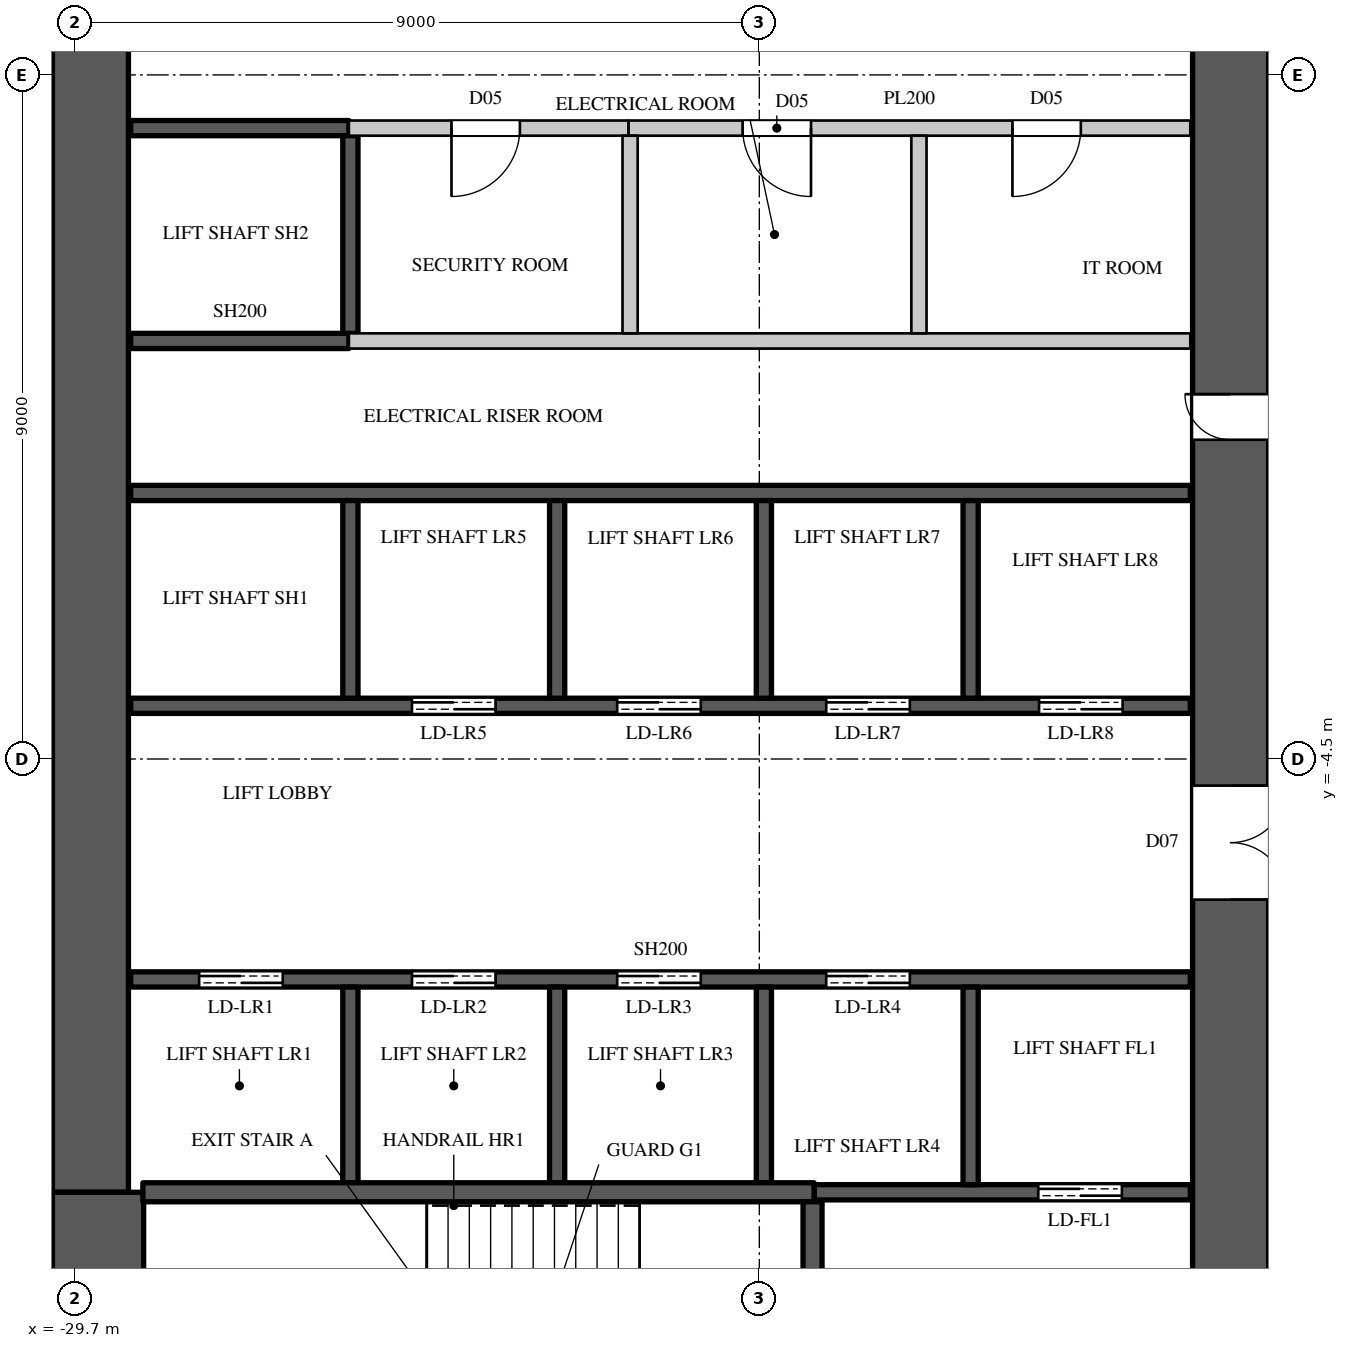
"""IFC4 building model, lengths in metres.
Left out: names, types, materials, properties, quantities, classifications, styles, units other than length and angle.
Written with IfcOpenShell. Run it as: python <this file> out.ifc"""

import sys

from ifc_helpers import new_model, si_unit, direction, frame, frame_2d, origin, place, context, subcontext, project, spatial, rectangle, extrude, element, fill, save


model = new_model("IFC4")
c1 = context("Model", 3, precision=1e-05, world=origin(), true_north=direction((0.0, 1.0)))
c2 = subcontext(c1, "Body", "Model", "MODEL_VIEW")
j1 = project(units=[si_unit("LENGTHUNIT", "METRE"), si_unit("PLANEANGLEUNIT", "RADIAN")], contexts=[c1])
p1 = place(None, origin())
s1 = spatial("IfcSite", under=j1, at=p1, CompositionType="ELEMENT")
p2 = place(p1, origin())
s2 = spatial("IfcBuilding", under=s1, at=p2, CompositionType="ELEMENT")
p3 = place(p2, frame((0.0, 0.0, 131.1)))
s3 = spatial("IfcBuildingStorey", under=s2, at=p3, CompositionType="ELEMENT", Elevation=131.1)
p4 = place(p3, frame((-14.5, -14.8, 0.0), z_axis=(0.0, 0.0, 1.0), x_axis=(0.0, 1.0, 0.0)))
e1 = element("IfcWall", 1, at=p4, inside=s3, PredefinedType="SHEAR", context=c2, shape_type="SweptSolid", body=[
    extrude(rectangle(XDim=29.6, YDim=1.0, at=frame_2d((14.8, 0.0))), origin(), (0.0, 0.0, 1.0), 3.6),
])
p5 = place(p4, frame((8.45, 0.0, 0.0)))
e2 = element("IfcOpeningElement", 2, at=p5, cuts=e1, PredefinedType="OPENING", context=c2, shape_type="SweptSolid", body=[
    extrude(rectangle(XDim=1.5, YDim=2.4, at=frame_2d((0.75, 1.2))), frame((0.0, 0.51, 0.0), z_axis=(0.0, -1.0, 0.0), x_axis=(1.0, 0.0, 0.0)), (0.0, 0.0, 1.0), 1.02),
])
p6 = place(p4, frame((19.65, 0.0, 0.0)))
e3 = element("IfcOpeningElement", 3, at=p6, cuts=e1, PredefinedType="OPENING", context=c2, shape_type="SweptSolid", body=[
    extrude(rectangle(XDim=1.5, YDim=2.4, at=frame_2d((0.75, 1.2))), frame((0.0, 0.51, 0.0), z_axis=(0.0, -1.0, 0.0), x_axis=(1.0, 0.0, 0.0)), (0.0, 0.0, 1.0), 1.02),
])
p7 = place(p4, frame((14.5, 0.0, 0.0)))
e4 = element("IfcOpeningElement", 4, at=p7, cuts=e1, PredefinedType="OPENING", context=c2, shape_type="SweptSolid", body=[
    extrude(rectangle(XDim=0.6, YDim=2.0, at=frame_2d((0.3, 1.0))), frame((0.0, 0.51, 0.0), z_axis=(0.0, -1.0, 0.0), x_axis=(1.0, 0.0, 0.0)), (0.0, 0.0, 1.0), 1.02),
])
p8 = place(p3, frame((-29.5, -10.2, 0.0), z_axis=(0.0, 0.0, 1.0), x_axis=(0.0, 1.0, 0.0)))
e5 = element("IfcWall", 5, at=p8, inside=s3, PredefinedType="SHEAR", context=c2, shape_type="SweptSolid", body=[
    extrude(rectangle(XDim=20.4, YDim=1.0, at=frame_2d((10.2, 0.0))), origin(), (0.0, 0.0, 1.0), 3.6),
])
p9 = place(p3, frame((-29.4, -14.8, 0.0), z_axis=(0.0, 0.0, 1.0), x_axis=(0.0, 1.0, 0.0)))
e6 = element("IfcWall", 6, at=p9, inside=s3, PredefinedType="SHEAR", context=c2, shape_type="SweptSolid", body=[
    extrude(rectangle(XDim=4.6, YDim=1.2, at=frame_2d((2.3, 0.0))), origin(), (0.0, 0.0, 1.0), 3.6),
])
p10 = place(p3, frame((-26.1, 3.8, 0.0), z_axis=(0.0, 0.0, 1.0), x_axis=(1.0, 0.0, 0.0)))
e7 = element("IfcWall", 7, at=p10, inside=s3, PredefinedType="PARTITIONING", context=c2, shape_type="SweptSolid", body=[
    extrude(rectangle(XDim=3.68, YDim=0.2, at=frame_2d((1.84, 0.0))), origin(), (0.0, 0.0, 1.0), 3.3),
])
p11 = place(p10, frame((1.35, 0.0, 0.0)))
e8 = element("IfcOpeningElement", 8, at=p11, cuts=e7, PredefinedType="OPENING", context=c2, shape_type="SweptSolid", body=[
    extrude(rectangle(XDim=0.9, YDim=2.2, at=frame_2d((0.45, 1.1))), frame((0.0, 0.11, 0.0), z_axis=(0.0, -1.0, 0.0), x_axis=(1.0, 0.0, 0.0)), (0.0, 0.0, 1.0), 0.22),
])
p12 = place(p3, frame((-26.1, 1.0, 0.0), z_axis=(0.0, 0.0, 1.0), x_axis=(1.0, 0.0, 0.0)))
e9 = element("IfcWall", 9, at=p12, inside=s3, PredefinedType="PARTITIONING", context=c2, shape_type="SweptSolid", body=[
    extrude(rectangle(XDim=11.07, YDim=0.2, at=frame_2d((5.535, 0.0))), origin(), (0.0, 0.0, 1.0), 3.3),
])
p13 = place(p3, frame((-22.42, 3.8, 0.0), z_axis=(0.0, 0.0, 1.0), x_axis=(1.0, 0.0, 0.0)))
e10 = element("IfcWall", 10, at=p13, inside=s3, PredefinedType="PARTITIONING", context=c2, shape_type="SweptSolid", body=[
    extrude(rectangle(XDim=7.39, YDim=0.2, at=frame_2d((3.695, 0.0))), origin(), (0.0, 0.0, 1.0), 3.3),
])
p14 = place(p13, frame((1.5, 0.0, 0.0)))
e11 = element("IfcOpeningElement", 11, at=p14, cuts=e10, PredefinedType="OPENING", context=c2, shape_type="SweptSolid", body=[
    extrude(rectangle(XDim=0.9, YDim=2.2, at=frame_2d((0.45, 1.1))), frame((0.0, 0.11, 0.0), z_axis=(0.0, -1.0, 0.0), x_axis=(1.0, 0.0, 0.0)), (0.0, 0.0, 1.0), 0.22),
])
p15 = place(p13, frame((5.05, 0.0, 0.0)))
e12 = element("IfcOpeningElement", 12, at=p15, cuts=e10, PredefinedType="OPENING", context=c2, shape_type="SweptSolid", body=[
    extrude(rectangle(XDim=0.9, YDim=2.2, at=frame_2d((0.45, 1.1))), frame((0.0, 0.11, 0.0), z_axis=(0.0, -1.0, 0.0), x_axis=(1.0, 0.0, 0.0)), (0.0, 0.0, 1.0), 0.22),
])
for number, where, z_axis, x_axis in (
    (13, (-22.4, 1.1, 0.0), (0.0, 0.0, 1.0), (0.0, 1.0, 0.0)),
    (14, (-18.6, 1.1, 0.0), (0.0, 0.0, 1.0), (0.0, 1.0, 0.0)),
):
    element("IfcWall", number, at=place(p3, frame(where, z_axis=z_axis, x_axis=x_axis)), inside=s3, PredefinedType="PARTITIONING", context=c2, shape_type="SweptSolid", body=[
        extrude(rectangle(XDim=2.6, YDim=0.2, at=frame_2d((1.3, 0.0))), origin(), (0.0, 0.0, 1.0), 3.3),
    ])
p16 = place(p3, frame((-28.97, -7.4, 0.0), z_axis=(0.0, 0.0, 1.0), x_axis=(1.0, 0.0, 0.0)))
e15 = element("IfcWall", 15, at=p16, inside=s3, PredefinedType="SHEAR", context=c2, shape_type="SweptSolid", body=[
    extrude(rectangle(XDim=13.94, YDim=0.2, at=frame_2d((6.97, 0.0))), origin(), (0.0, 0.0, 1.0), 3.3),
])
p17 = place(p16, frame((0.9, 0.0, 0.0)))
e16 = element("IfcOpeningElement", 16, at=p17, cuts=e15, PredefinedType="OPENING", context=c2, shape_type="SweptSolid", body=[
    extrude(rectangle(XDim=1.1, YDim=2.2, at=frame_2d((0.55, 1.1))), frame((0.0, 0.11, 0.0), z_axis=(0.0, -1.0, 0.0), x_axis=(1.0, 0.0, 0.0)), (0.0, 0.0, 1.0), 0.22),
])
p18 = place(p16, frame((3.7, 0.0, 0.0)))
e17 = element("IfcOpeningElement", 17, at=p18, cuts=e15, PredefinedType="OPENING", context=c2, shape_type="SweptSolid", body=[
    extrude(rectangle(XDim=1.1, YDim=2.2, at=frame_2d((0.55, 1.1))), frame((0.0, 0.11, 0.0), z_axis=(0.0, -1.0, 0.0), x_axis=(1.0, 0.0, 0.0)), (0.0, 0.0, 1.0), 0.22),
])
p19 = place(p16, frame((6.4, 0.0, 0.0)))
e18 = element("IfcOpeningElement", 18, at=p19, cuts=e15, PredefinedType="OPENING", context=c2, shape_type="SweptSolid", body=[
    extrude(rectangle(XDim=1.1, YDim=2.2, at=frame_2d((0.55, 1.1))), frame((0.0, 0.11, 0.0), z_axis=(0.0, -1.0, 0.0), x_axis=(1.0, 0.0, 0.0)), (0.0, 0.0, 1.0), 0.22),
])
p20 = place(p16, frame((9.15, 0.0, 0.0)))
e19 = element("IfcOpeningElement", 19, at=p20, cuts=e15, PredefinedType="OPENING", context=c2, shape_type="SweptSolid", body=[
    extrude(rectangle(XDim=1.1, YDim=2.2, at=frame_2d((0.55, 1.1))), frame((0.0, 0.11, 0.0), z_axis=(0.0, -1.0, 0.0), x_axis=(1.0, 0.0, 0.0)), (0.0, 0.0, 1.0), 0.22),
])
p21 = place(p3, frame((-28.97, -3.8, 0.0), z_axis=(0.0, 0.0, 1.0), x_axis=(1.0, 0.0, 0.0)))
e20 = element("IfcWall", 20, at=p21, inside=s3, PredefinedType="SHEAR", context=c2, shape_type="SweptSolid", body=[
    extrude(rectangle(XDim=13.94, YDim=0.2, at=frame_2d((6.97, 0.0))), origin(), (0.0, 0.0, 1.0), 3.3),
])
p22 = place(p21, frame((3.7, 0.0, 0.0)))
e21 = element("IfcOpeningElement", 21, at=p22, cuts=e20, PredefinedType="OPENING", context=c2, shape_type="SweptSolid", body=[
    extrude(rectangle(XDim=1.1, YDim=2.2, at=frame_2d((0.55, 1.1))), frame((0.0, 0.11, 0.0), z_axis=(0.0, -1.0, 0.0), x_axis=(1.0, 0.0, 0.0)), (0.0, 0.0, 1.0), 0.22),
])
p23 = place(p21, frame((6.4, 0.0, 0.0)))
e22 = element("IfcOpeningElement", 22, at=p23, cuts=e20, PredefinedType="OPENING", context=c2, shape_type="SweptSolid", body=[
    extrude(rectangle(XDim=1.1, YDim=2.2, at=frame_2d((0.55, 1.1))), frame((0.0, 0.11, 0.0), z_axis=(0.0, -1.0, 0.0), x_axis=(1.0, 0.0, 0.0)), (0.0, 0.0, 1.0), 0.22),
])
p24 = place(p21, frame((9.15, 0.0, 0.0)))
e23 = element("IfcOpeningElement", 23, at=p24, cuts=e20, PredefinedType="OPENING", context=c2, shape_type="SweptSolid", body=[
    extrude(rectangle(XDim=1.1, YDim=2.2, at=frame_2d((0.55, 1.1))), frame((0.0, 0.11, 0.0), z_axis=(0.0, -1.0, 0.0), x_axis=(1.0, 0.0, 0.0)), (0.0, 0.0, 1.0), 0.22),
])
p25 = place(p21, frame((11.95, 0.0, 0.0)))
e24 = element("IfcOpeningElement", 24, at=p25, cuts=e20, PredefinedType="OPENING", context=c2, shape_type="SweptSolid", body=[
    extrude(rectangle(XDim=1.1, YDim=2.2, at=frame_2d((0.55, 1.1))), frame((0.0, 0.11, 0.0), z_axis=(0.0, -1.0, 0.0), x_axis=(1.0, 0.0, 0.0)), (0.0, 0.0, 1.0), 0.22),
])
p26 = place(p3, frame((-28.97, -1.0, 0.0), z_axis=(0.0, 0.0, 1.0), x_axis=(1.0, 0.0, 0.0)))
e25 = element("IfcWall", 25, at=p26, inside=s3, PredefinedType="SHEAR", context=c2, shape_type="SweptSolid", body=[
    extrude(rectangle(XDim=13.94, YDim=0.2, at=frame_2d((6.97, 0.0))), origin(), (0.0, 0.0, 1.0), 3.3),
])
for number, where, z_axis, x_axis in (
    (26, (-28.97, 1.0, 0.0), (0.0, 0.0, 1.0), (1.0, 0.0, 0.0)),
    (27, (-28.97, 3.8, 0.0), (0.0, 0.0, 1.0), (1.0, 0.0, 0.0)),
):
    element("IfcWall", number, at=place(p3, frame(where, z_axis=z_axis, x_axis=x_axis)), inside=s3, PredefinedType="SHEAR", context=c2, shape_type="SweptSolid", body=[
        extrude(rectangle(XDim=2.87, YDim=0.2, at=frame_2d((1.435, 0.0))), origin(), (0.0, 0.0, 1.0), 3.3),
    ])
p27 = place(p3, frame((-26.08, -10.075, 0.0), z_axis=(0.0, 0.0, 1.0), x_axis=(0.0, 1.0, 0.0)))
e28 = element("IfcWall", 28, at=p27, inside=s3, PredefinedType="SHEAR", context=c2, shape_type="SweptSolid", body=[
    extrude(rectangle(XDim=2.575, YDim=0.2, at=frame_2d((1.288, 0.0))), origin(), (0.0, 0.0, 1.0), 3.6),
])
p28 = place(p3, frame((-26.08, -3.7, 0.0), z_axis=(0.0, 0.0, 1.0), x_axis=(0.0, 1.0, 0.0)))
e29 = element("IfcWall", 29, at=p28, inside=s3, PredefinedType="SHEAR", context=c2, shape_type="SweptSolid", body=[
    extrude(rectangle(XDim=2.6, YDim=0.2, at=frame_2d((1.3, 0.0))), origin(), (0.0, 0.0, 1.0), 3.6),
])
p29 = place(p3, frame((-26.08, 1.1, 0.0), z_axis=(0.0, 0.0, 1.0), x_axis=(0.0, 1.0, 0.0)))
e30 = element("IfcWall", 30, at=p29, inside=s3, PredefinedType="SHEAR", context=c2, shape_type="SweptSolid", body=[
    extrude(rectangle(XDim=2.6, YDim=0.2, at=frame_2d((1.3, 0.0))), origin(), (0.0, 0.0, 1.0), 3.3),
])
p30 = place(p3, frame((-23.36, -10.075, 0.0), z_axis=(0.0, 0.0, 1.0), x_axis=(0.0, 1.0, 0.0)))
e31 = element("IfcWall", 31, at=p30, inside=s3, PredefinedType="SHEAR", context=c2, shape_type="SweptSolid", body=[
    extrude(rectangle(XDim=2.575, YDim=0.2, at=frame_2d((1.288, 0.0))), origin(), (0.0, 0.0, 1.0), 3.6),
])
p31 = place(p3, frame((-23.36, -3.7, 0.0), z_axis=(0.0, 0.0, 1.0), x_axis=(0.0, 1.0, 0.0)))
e32 = element("IfcWall", 32, at=p31, inside=s3, PredefinedType="SHEAR", context=c2, shape_type="SweptSolid", body=[
    extrude(rectangle(XDim=2.6, YDim=0.2, at=frame_2d((1.3, 0.0))), origin(), (0.0, 0.0, 1.0), 3.6),
])
p32 = place(p3, frame((-20.64, -10.075, 0.0), z_axis=(0.0, 0.0, 1.0), x_axis=(0.0, 1.0, 0.0)))
e33 = element("IfcWall", 33, at=p32, inside=s3, PredefinedType="SHEAR", context=c2, shape_type="SweptSolid", body=[
    extrude(rectangle(XDim=2.575, YDim=0.2, at=frame_2d((1.288, 0.0))), origin(), (0.0, 0.0, 1.0), 3.6),
])
p33 = place(p3, frame((-20.64, -3.7, 0.0), z_axis=(0.0, 0.0, 1.0), x_axis=(0.0, 1.0, 0.0)))
e34 = element("IfcWall", 34, at=p33, inside=s3, PredefinedType="SHEAR", context=c2, shape_type="SweptSolid", body=[
    extrude(rectangle(XDim=2.6, YDim=0.2, at=frame_2d((1.3, 0.0))), origin(), (0.0, 0.0, 1.0), 3.6),
])
p34 = place(p3, frame((-19.98, -10.2, 0.0), z_axis=(0.0, 0.0, 1.0), x_axis=(1.0, 0.0, 0.0)))
e35 = element("IfcWall", 35, at=p34, inside=s3, PredefinedType="SHEAR", context=c2, shape_type="SweptSolid", body=[
    extrude(rectangle(XDim=4.95, YDim=0.2, at=frame_2d((2.475, 0.0))), origin(), (0.0, 0.0, 1.0), 3.3),
])
p35 = place(p34, frame((2.95, 0.0, 0.0)))
e36 = element("IfcOpeningElement", 36, at=p35, cuts=e35, PredefinedType="OPENING", context=c2, shape_type="SweptSolid", body=[
    extrude(rectangle(XDim=1.1, YDim=2.2, at=frame_2d((0.55, 1.1))), frame((0.0, 0.11, 0.0), z_axis=(0.0, -1.0, 0.0), x_axis=(1.0, 0.0, 0.0)), (0.0, 0.0, 1.0), 0.22),
])
p36 = place(p3, frame((-17.92, -10.1, 0.0), z_axis=(0.0, 0.0, 1.0), x_axis=(0.0, 1.0, 0.0)))
e37 = element("IfcWall", 37, at=p36, inside=s3, PredefinedType="SHEAR", context=c2, shape_type="SweptSolid", body=[
    extrude(rectangle(XDim=2.6, YDim=0.2, at=frame_2d((1.3, 0.0))), origin(), (0.0, 0.0, 1.0), 3.6),
])
p37 = place(p3, frame((-17.92, -3.7, 0.0), z_axis=(0.0, 0.0, 1.0), x_axis=(0.0, 1.0, 0.0)))
e38 = element("IfcWall", 38, at=p37, inside=s3, PredefinedType="SHEAR", context=c2, shape_type="SweptSolid", body=[
    extrude(rectangle(XDim=2.6, YDim=0.2, at=frame_2d((1.3, 0.0))), origin(), (0.0, 0.0, 1.0), 3.6),
])
p38 = place(p3, frame((-28.81, -10.2, 0.0), z_axis=(0.0, 0.0, 1.0), x_axis=(1.0, 0.0, 0.0)))
e39 = element("IfcWall", 39, at=p38, inside=s3, PredefinedType="SHEAR", context=c2, shape_type="SweptSolid", body=[
    extrude(rectangle(XDim=8.83, YDim=0.25, at=frame_2d((4.415, 0.0))), origin(), (0.0, 0.0, 1.0), 3.3),
])
p39 = place(p3, frame((-20.0, -14.77, 0.0), z_axis=(0.0, 0.0, 1.0), x_axis=(0.0, 1.0, 0.0)))
e40 = element("IfcWall", 40, at=p39, inside=s3, PredefinedType="SHEAR", context=c2, shape_type="SweptSolid", body=[
    extrude(rectangle(XDim=4.445, YDim=0.25, at=frame_2d((2.223, 0.0))), origin(), (0.0, 0.0, 1.0), 3.3),
])
p40 = place(p39, frame((1.7, 0.0, 0.0)))
e41 = element("IfcOpeningElement", 41, at=p40, cuts=e40, PredefinedType="OPENING", context=c2, shape_type="SweptSolid", body=[
    extrude(rectangle(XDim=1.1, YDim=2.2, at=frame_2d((0.55, 1.1))), frame((0.0, 0.135, 0.0), z_axis=(0.0, -1.0, 0.0), x_axis=(1.0, 0.0, 0.0)), (0.0, 0.0, 1.0), 0.27),
])
p41 = place(p11, origin())
e42 = element("IfcDoor", 42, at=p41, inside=s3, OperationType="SINGLE_SWING_RIGHT", PredefinedType="DOOR", context=c2, shape_type="SweptSolid", body=[
    extrude(rectangle(XDim=0.9, YDim=2.2, at=frame_2d((0.45, 1.1))), frame((0.0, 0.025, 0.0), z_axis=(0.0, -1.0, 0.0), x_axis=(1.0, 0.0, 0.0)), (0.0, 0.0, 1.0), 0.05),
])
fill(e8, e42)
p42 = place(p14, origin())
e43 = element("IfcDoor", 43, at=p42, inside=s3, OperationType="SINGLE_SWING_LEFT", PredefinedType="DOOR", context=c2, shape_type="SweptSolid", body=[
    extrude(rectangle(XDim=0.9, YDim=2.2, at=frame_2d((0.45, 1.1))), frame((0.0, 0.025, 0.0), z_axis=(0.0, -1.0, 0.0), x_axis=(1.0, 0.0, 0.0)), (0.0, 0.0, 1.0), 0.05),
])
fill(e11, e43)
p43 = place(p15, origin())
e44 = element("IfcDoor", 44, at=p43, inside=s3, OperationType="SINGLE_SWING_RIGHT", PredefinedType="DOOR", context=c2, shape_type="SweptSolid", body=[
    extrude(rectangle(XDim=0.9, YDim=2.2, at=frame_2d((0.45, 1.1))), frame((0.0, 0.025, 0.0), z_axis=(0.0, -1.0, 0.0), x_axis=(1.0, 0.0, 0.0)), (0.0, 0.0, 1.0), 0.05),
])
fill(e12, e44)
p44 = place(p17, origin())
e45 = element("IfcDoor", 45, at=p44, inside=s3, OperationType="DOUBLE_DOOR_SLIDING", PredefinedType="DOOR", context=c2, shape_type="SweptSolid", body=[
    extrude(rectangle(XDim=1.1, YDim=2.2, at=frame_2d((0.55, 1.1))), frame((0.0, 0.025, 0.0), z_axis=(0.0, -1.0, 0.0), x_axis=(1.0, 0.0, 0.0)), (0.0, 0.0, 1.0), 0.05),
])
fill(e16, e45)
p45 = place(p18, origin())
e46 = element("IfcDoor", 46, at=p45, inside=s3, OperationType="DOUBLE_DOOR_SLIDING", PredefinedType="DOOR", context=c2, shape_type="SweptSolid", body=[
    extrude(rectangle(XDim=1.1, YDim=2.2, at=frame_2d((0.55, 1.1))), frame((0.0, 0.025, 0.0), z_axis=(0.0, -1.0, 0.0), x_axis=(1.0, 0.0, 0.0)), (0.0, 0.0, 1.0), 0.05),
])
fill(e17, e46)
p46 = place(p19, origin())
e47 = element("IfcDoor", 47, at=p46, inside=s3, OperationType="DOUBLE_DOOR_SLIDING", PredefinedType="DOOR", context=c2, shape_type="SweptSolid", body=[
    extrude(rectangle(XDim=1.1, YDim=2.2, at=frame_2d((0.55, 1.1))), frame((0.0, 0.025, 0.0), z_axis=(0.0, -1.0, 0.0), x_axis=(1.0, 0.0, 0.0)), (0.0, 0.0, 1.0), 0.05),
])
fill(e18, e47)
p47 = place(p20, origin())
e48 = element("IfcDoor", 48, at=p47, inside=s3, OperationType="DOUBLE_DOOR_SLIDING", PredefinedType="DOOR", context=c2, shape_type="SweptSolid", body=[
    extrude(rectangle(XDim=1.1, YDim=2.2, at=frame_2d((0.55, 1.1))), frame((0.0, 0.025, 0.0), z_axis=(0.0, -1.0, 0.0), x_axis=(1.0, 0.0, 0.0)), (0.0, 0.0, 1.0), 0.05),
])
fill(e19, e48)
p48 = place(p35, origin())
e49 = element("IfcDoor", 49, at=p48, inside=s3, OperationType="DOUBLE_DOOR_SLIDING", PredefinedType="DOOR", context=c2, shape_type="SweptSolid", body=[
    extrude(rectangle(XDim=1.1, YDim=2.2, at=frame_2d((0.55, 1.1))), frame((0.0, 0.025, 0.0), z_axis=(0.0, -1.0, 0.0), x_axis=(1.0, 0.0, 0.0)), (0.0, 0.0, 1.0), 0.05),
])
fill(e36, e49)
p49 = place(p22, origin())
e50 = element("IfcDoor", 50, at=p49, inside=s3, OperationType="DOUBLE_DOOR_SLIDING", PredefinedType="DOOR", context=c2, shape_type="SweptSolid", body=[
    extrude(rectangle(XDim=1.1, YDim=2.2, at=frame_2d((0.55, 1.1))), frame((0.0, 0.025, 0.0), z_axis=(0.0, -1.0, 0.0), x_axis=(1.0, 0.0, 0.0)), (0.0, 0.0, 1.0), 0.05),
])
fill(e21, e50)
p50 = place(p23, origin())
e51 = element("IfcDoor", 51, at=p50, inside=s3, OperationType="DOUBLE_DOOR_SLIDING", PredefinedType="DOOR", context=c2, shape_type="SweptSolid", body=[
    extrude(rectangle(XDim=1.1, YDim=2.2, at=frame_2d((0.55, 1.1))), frame((0.0, 0.025, 0.0), z_axis=(0.0, -1.0, 0.0), x_axis=(1.0, 0.0, 0.0)), (0.0, 0.0, 1.0), 0.05),
])
fill(e22, e51)
p51 = place(p24, origin())
e52 = element("IfcDoor", 52, at=p51, inside=s3, OperationType="DOUBLE_DOOR_SLIDING", PredefinedType="DOOR", context=c2, shape_type="SweptSolid", body=[
    extrude(rectangle(XDim=1.1, YDim=2.2, at=frame_2d((0.55, 1.1))), frame((0.0, 0.025, 0.0), z_axis=(0.0, -1.0, 0.0), x_axis=(1.0, 0.0, 0.0)), (0.0, 0.0, 1.0), 0.05),
])
fill(e23, e52)
p52 = place(p25, origin())
e53 = element("IfcDoor", 53, at=p52, inside=s3, OperationType="DOUBLE_DOOR_SLIDING", PredefinedType="DOOR", context=c2, shape_type="SweptSolid", body=[
    extrude(rectangle(XDim=1.1, YDim=2.2, at=frame_2d((0.55, 1.1))), frame((0.0, 0.025, 0.0), z_axis=(0.0, -1.0, 0.0), x_axis=(1.0, 0.0, 0.0)), (0.0, 0.0, 1.0), 0.05),
])
fill(e24, e53)
p53 = place(p5, origin())
e54 = element("IfcDoor", 54, at=p53, inside=s3, OperationType="DOUBLE_DOOR_SINGLE_SWING", PredefinedType="DOOR", context=c2, shape_type="SweptSolid", body=[
    extrude(rectangle(XDim=1.5, YDim=2.4, at=frame_2d((0.75, 1.2))), frame((0.0, -0.445, 0.0), z_axis=(0.0, -1.0, 0.0), x_axis=(1.0, 0.0, 0.0)), (0.0, 0.0, 1.0), 0.05),
])
fill(e2, e54)
p54 = place(p7, origin())
e55 = element("IfcDoor", 55, at=p54, inside=s3, OperationType="SINGLE_SWING_RIGHT", PredefinedType="DOOR", context=c2, shape_type="SweptSolid", body=[
    extrude(rectangle(XDim=0.6, YDim=2.0, at=frame_2d((0.3, 1.0))), frame((0.0, 0.495, 0.0), z_axis=(0.0, -1.0, 0.0), x_axis=(1.0, 0.0, 0.0)), (0.0, 0.0, 1.0), 0.05),
])
fill(e4, e55)
save(model, sys.argv[1])
